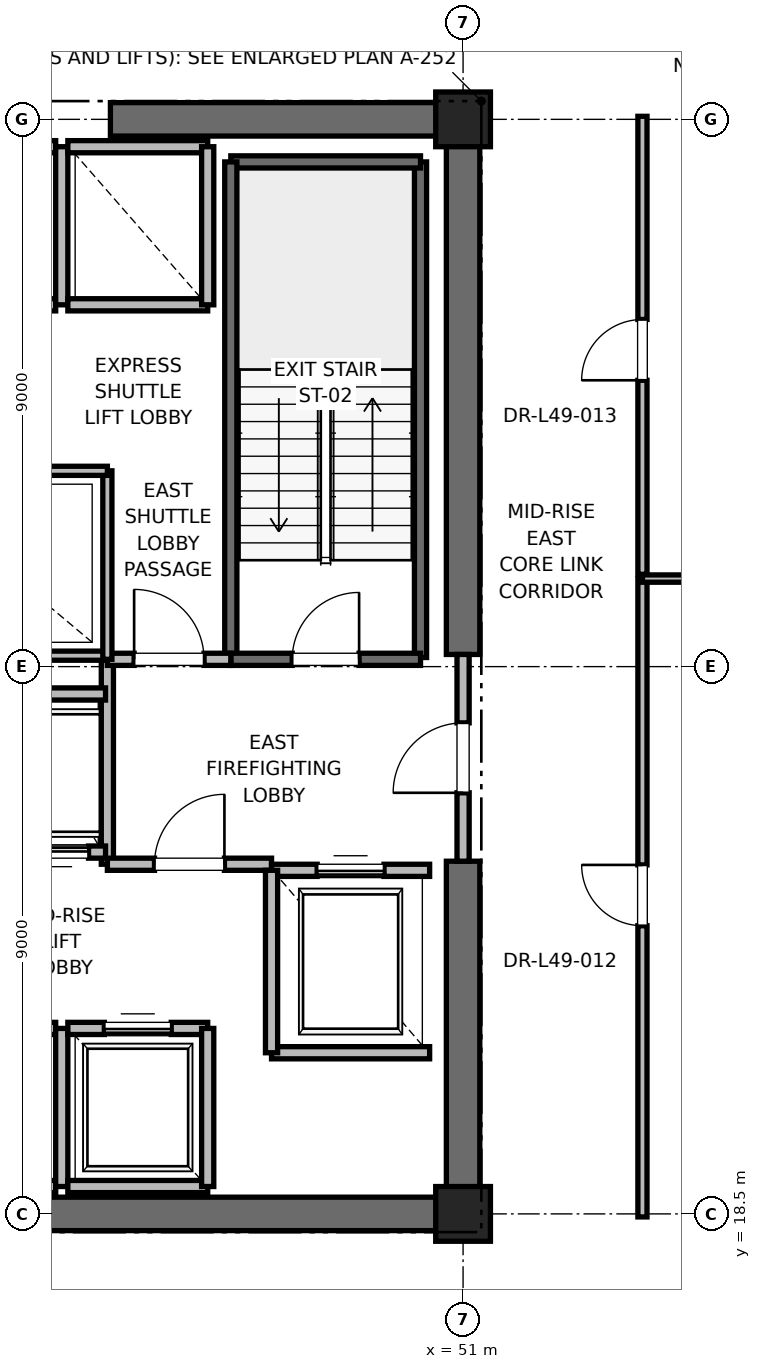
"""IFC4 building model, lengths in metres.
Left out: names, types, materials, properties, quantities, classifications, styles, units other than length and angle.
Written with IfcOpenShell. Run it as: python <this file> out.ifc"""

import sys

from ifc_helpers import new_model, si_unit, direction, frame, frame_2d, origin, origin_2d, place, context, subcontext, project, spatial, rectangle, extrude, element, fill, save


model = new_model("IFC4")
c1 = context("Model", 3, precision=1e-05, world=origin(), true_north=direction((0.0, 1.0)))
c2 = subcontext(c1, "Body", "Model", "MODEL_VIEW")
j1 = project(units=[si_unit("LENGTHUNIT", "METRE"), si_unit("PLANEANGLEUNIT", "RADIAN")], contexts=[c1])
p1 = place(None, origin())
s1 = spatial("IfcSite", under=j1, at=p1, CompositionType="ELEMENT")
p2 = place(p1, origin())
s2 = spatial("IfcBuilding", under=s1, at=p2, CompositionType="ELEMENT")
p3 = place(p2, frame((0.0, 0.0, 213.2)))
s3 = spatial("IfcBuildingStorey", under=s2, at=p3, CompositionType="ELEMENT", Elevation=213.2)
for number, where, z_axis, x_axis in (
    (1, (51.0, 18.5, 0.0), (0.0, 0.0, 1.0), (1.0, 0.0, 0.0)),
    (2, (51.0, 36.5, 0.0), (0.0, 0.0, 1.0), (1.0, 0.0, 0.0)),
):
    element("IfcColumn", number, at=place(p3, frame(where, z_axis=z_axis, x_axis=x_axis)), inside=s3, PredefinedType="PILASTER", context=c2, shape_type="SweptSolid", body=[
        extrude(rectangle(XDim=0.9, YDim=0.9, at=origin_2d()), origin(), (0.0, 0.0, 1.0), 4.0),
    ])
p4 = place(p3, frame((41.8, 18.5, 0.0), z_axis=(0.0, 0.0, 1.0), x_axis=(1.0, 0.0, 0.0)))
e3 = element("IfcWall", 3, at=p4, inside=s3, PredefinedType="SHEAR", context=c2, shape_type="SweptSolid", body=[
    extrude(rectangle(XDim=9.2, YDim=0.55, at=frame_2d((4.6, 0.0))), origin(), (0.0, 0.0, 1.0), 3.775),
])
for number, where, z_axis, x_axis in (
    (4, (45.2, 36.5, 0.0), (0.0, 0.0, 1.0), (1.0, 0.0, 0.0)),
    (5, (51.0, 18.5, 0.0), (0.0, 0.0, 1.0), (0.0, 1.0, 0.0)),
):
    element("IfcWall", number, at=place(p3, frame(where, z_axis=z_axis, x_axis=x_axis)), inside=s3, PredefinedType="SHEAR", context=c2, shape_type="SweptSolid", body=[
        extrude(rectangle(XDim=5.8, YDim=0.55, at=frame_2d((2.9, 0.0))), origin(), (0.0, 0.0, 1.0), 3.775),
    ])
p5 = place(p3, frame((51.0, 27.7, 0.0), z_axis=(0.0, 0.0, 1.0), x_axis=(0.0, 1.0, 0.0)))
e6 = element("IfcWall", 6, at=p5, inside=s3, PredefinedType="SHEAR", context=c2, shape_type="SweptSolid", body=[
    extrude(rectangle(XDim=8.8, YDim=0.55, at=frame_2d((4.4, 0.0))), origin(), (0.0, 0.0, 1.0), 3.775),
])
p6 = place(p3, frame((50.3, 27.65, 0.0), z_axis=(0.0, 0.0, 1.0), x_axis=(0.0, 1.0, 0.0)))
e7 = element("IfcWall", 7, at=p6, inside=s3, PredefinedType="SOLIDWALL", context=c2, shape_type="SweptSolid", body=[
    extrude(rectangle(XDim=8.15, YDim=0.2, at=frame_2d((4.075, 0.0))), origin(), (0.0, 0.0, 1.0), 3.775),
])
p7 = place(p3, frame((47.18, 35.8, 0.0), z_axis=(0.0, 0.0, 1.0), x_axis=(1.0, 0.0, 0.0)))
e8 = element("IfcWall", 8, at=p7, inside=s3, PredefinedType="SOLIDWALL", context=c2, shape_type="SweptSolid", body=[
    extrude(rectangle(XDim=3.12, YDim=0.2, at=frame_2d((1.56, 0.0))), origin(), (0.0, 0.0, 1.0), 3.775),
])
p8 = place(p3, frame((47.18, 27.62, 0.0), z_axis=(0.0, 0.0, 1.0), x_axis=(0.0, 1.0, 0.0)))
e9 = element("IfcWall", 9, at=p8, inside=s3, PredefinedType="SOLIDWALL", context=c2, shape_type="SweptSolid", body=[
    extrude(rectangle(XDim=8.18, YDim=0.2, at=frame_2d((4.09, 0.0))), origin(), (0.0, 0.0, 1.0), 3.775),
])
p9 = place(p3, frame((47.18, 27.62, 0.0), z_axis=(0.0, 0.0, 1.0), x_axis=(1.0, 0.0, 0.0)))
e10 = element("IfcWall", 10, at=p9, inside=s3, PredefinedType="SOLIDWALL", context=c2, shape_type="SweptSolid", body=[
    extrude(rectangle(XDim=3.12, YDim=0.2, at=frame_2d((1.56, 0.0))), origin(), (0.0, 0.0, 1.0), 3.775),
])
p10 = place(p9, frame((1.01, 0.0, 0.0)))
e11 = element("IfcOpeningElement", 11, at=p10, cuts=e10, PredefinedType="OPENING", context=c2, shape_type="SweptSolid", body=[
    extrude(rectangle(XDim=1.1, YDim=2.15, at=frame_2d((0.55, 1.075))), frame((0.0, 0.1, 0.0), z_axis=(0.0, -1.0, 0.0), x_axis=(1.0, 0.0, 0.0)), (0.0, 0.0, 1.0), 0.2),
])
p11 = place(p3, frame((45.15, 24.25, 0.0), z_axis=(0.0, 0.0, 1.0), x_axis=(0.0, 1.0, 0.0)))
e12 = element("IfcWall", 12, at=p11, inside=s3, PredefinedType="PARTITIONING", context=c2, shape_type="SweptSolid", body=[
    extrude(rectangle(XDim=3.37, YDim=0.2, at=frame_2d((1.685, 0.0))), origin(), (0.0, 0.0, 1.0), 3.775),
])
p12 = place(p3, frame((45.15, 24.25, 0.0), z_axis=(0.0, 0.0, 1.0), x_axis=(1.0, 0.0, 0.0)))
e13 = element("IfcWall", 13, at=p12, inside=s3, PredefinedType="PARTITIONING", context=c2, shape_type="SweptSolid", body=[
    extrude(rectangle(XDim=2.7, YDim=0.2, at=frame_2d((1.35, 0.0))), origin(), (0.0, 0.0, 1.0), 3.775),
])
p13 = place(p12, frame((0.775, 0.0, 0.0)))
e14 = element("IfcOpeningElement", 14, at=p13, cuts=e13, PredefinedType="OPENING", context=c2, shape_type="SweptSolid", body=[
    extrude(rectangle(XDim=1.15, YDim=2.2, at=frame_2d((0.575, 1.1))), frame((0.0, 0.1, 0.0), z_axis=(0.0, -1.0, 0.0), x_axis=(1.0, 0.0, 0.0)), (0.0, 0.0, 1.0), 0.2),
])
p14 = place(p3, frame((45.15, 27.62, 0.0), z_axis=(0.0, 0.0, 1.0), x_axis=(1.0, 0.0, 0.0)))
e15 = element("IfcWall", 15, at=p14, inside=s3, PredefinedType="PARTITIONING", context=c2, shape_type="SweptSolid", body=[
    extrude(rectangle(XDim=2.03, YDim=0.2, at=frame_2d((1.015, 0.0))), origin(), (0.0, 0.0, 1.0), 3.775),
])
p15 = place(p14, frame((0.44, 0.0, 0.0)))
e16 = element("IfcOpeningElement", 16, at=p15, cuts=e15, PredefinedType="OPENING", context=c2, shape_type="SweptSolid", body=[
    extrude(rectangle(XDim=1.15, YDim=2.2, at=frame_2d((0.575, 1.1))), frame((0.0, 0.1, 0.0), z_axis=(0.0, -1.0, 0.0), x_axis=(1.0, 0.0, 0.0)), (0.0, 0.0, 1.0), 0.2),
])
p16 = place(p3, frame((51.0, 24.3, 0.0), z_axis=(0.0, 0.0, 1.0), x_axis=(0.0, 1.0, 0.0)))
e17 = element("IfcWall", 17, at=p16, inside=s3, PredefinedType="PARTITIONING", context=c2, shape_type="SweptSolid", body=[
    extrude(rectangle(XDim=3.4, YDim=0.2, at=frame_2d((1.7, 0.0))), origin(), (0.0, 0.0, 1.0), 2.755),
])
p17 = place(p16, frame((1.125, 0.0, 0.0)))
e18 = element("IfcOpeningElement", 18, at=p17, cuts=e17, PredefinedType="OPENING", context=c2, shape_type="SweptSolid", body=[
    extrude(rectangle(XDim=1.15, YDim=2.2, at=frame_2d((0.575, 1.1))), frame((0.0, 0.1, 0.0), z_axis=(0.0, -1.0, 0.0), x_axis=(1.0, 0.0, 0.0)), (0.0, 0.0, 1.0), 0.2),
])
p18 = place(p3, frame((47.85, 21.15, 0.0), z_axis=(0.0, 0.0, 1.0), x_axis=(1.0, 0.0, 0.0)))
e19 = element("IfcWall", 19, at=p18, inside=s3, PredefinedType="SOLIDWALL", context=c2, shape_type="SweptSolid", body=[
    extrude(rectangle(XDim=2.6, YDim=0.2, at=frame_2d((1.3, 0.0))), origin(), (0.0, 0.0, 1.0), 3.775),
])
p19 = place(p3, frame((50.45, 24.15, 0.0), z_axis=(0.0, 0.0, 1.0), x_axis=(-1.0, 0.0, 0.0)))
e20 = element("IfcWall", 20, at=p19, inside=s3, PredefinedType="SOLIDWALL", context=c2, shape_type="SweptSolid", body=[
    extrude(rectangle(XDim=2.6, YDim=0.2, at=frame_2d((1.3, 0.0))), origin(), (0.0, 0.0, 1.0), 2.755),
])
p20 = place(p19, frame((0.75, 0.0, 0.0)))
e21 = element("IfcOpeningElement", 21, at=p20, cuts=e20, PredefinedType="OPENING", context=c2, shape_type="SweptSolid", body=[
    extrude(rectangle(XDim=1.1, YDim=2.2, at=frame_2d((0.55, 1.1))), frame((0.0, 0.1, 0.0), z_axis=(0.0, -1.0, 0.0), x_axis=(1.0, 0.0, 0.0)), (0.0, 0.0, 1.0), 0.2),
])
p21 = place(p3, frame((47.85, 24.15, 0.0), z_axis=(0.0, 0.0, 1.0), x_axis=(0.0, -1.0, 0.0)))
e22 = element("IfcWall", 22, at=p21, inside=s3, PredefinedType="SOLIDWALL", context=c2, shape_type="SweptSolid", body=[
    extrude(rectangle(XDim=3.0, YDim=0.2, at=frame_2d((1.5, 0.0))), origin(), (0.0, 0.0, 1.0), 3.775),
])
p22 = place(p3, frame((42.0, 18.95, 0.0), z_axis=(0.0, 0.0, 1.0), x_axis=(1.0, 0.0, 0.0)))
e23 = element("IfcWall", 23, at=p22, inside=s3, PredefinedType="SOLIDWALL", context=c2, shape_type="SweptSolid", body=[
    extrude(rectangle(XDim=2.3, YDim=0.2, at=frame_2d((1.15, 0.0))), origin(), (0.0, 0.0, 1.0), 2.755),
])
p23 = place(p3, frame((44.3, 21.55, 0.0), z_axis=(0.0, 0.0, 1.0), x_axis=(-1.0, 0.0, 0.0)))
e24 = element("IfcWall", 24, at=p23, inside=s3, PredefinedType="SOLIDWALL", context=c2, shape_type="SweptSolid", body=[
    extrude(rectangle(XDim=2.3, YDim=0.2, at=frame_2d((1.15, 0.0))), origin(), (0.0, 0.0, 1.0), 3.775),
])
p24 = place(p23, frame((0.6, 0.0, 0.0)))
e25 = element("IfcOpeningElement", 25, at=p24, cuts=e24, PredefinedType="OPENING", context=c2, shape_type="SweptSolid", body=[
    extrude(rectangle(XDim=1.1, YDim=2.2, at=frame_2d((0.55, 1.1))), frame((0.0, 0.1, 0.0), z_axis=(0.0, -1.0, 0.0), x_axis=(1.0, 0.0, 0.0)), (0.0, 0.0, 1.0), 0.2),
])
p25 = place(p3, frame((44.4, 18.95, 0.0), z_axis=(0.0, 0.0, 1.0), x_axis=(0.0, 1.0, 0.0)))
e26 = element("IfcWall", 26, at=p25, inside=s3, PredefinedType="SOLIDWALL", context=c2, shape_type="SweptSolid", body=[
    extrude(rectangle(XDim=2.6, YDim=0.2, at=frame_2d((1.3, 0.0))), origin(), (0.0, 0.0, 1.0), 3.775),
])
p26 = place(p3, frame((44.5, 18.95, 0.0), z_axis=(0.0, 0.0, 1.0), x_axis=(1.0, 0.0, 0.0)))
e27 = element("IfcWall", 27, at=p26, inside=s3, PredefinedType="SOLIDWALL", context=c2, shape_type="SweptSolid", body=[
    extrude(rectangle(XDim=2.3, YDim=0.2, at=frame_2d((1.15, 0.0))), origin(), (0.0, 0.0, 1.0), 3.775),
])
p27 = place(p3, frame((46.8, 21.55, 0.0), z_axis=(0.0, 0.0, 1.0), x_axis=(-1.0, 0.0, 0.0)))
e28 = element("IfcWall", 28, at=p27, inside=s3, PredefinedType="SOLIDWALL", context=c2, shape_type="SweptSolid", body=[
    extrude(rectangle(XDim=2.3, YDim=0.2, at=frame_2d((1.15, 0.0))), origin(), (0.0, 0.0, 1.0), 3.775),
])
p28 = place(p27, frame((0.6, 0.0, 0.0)))
e29 = element("IfcOpeningElement", 29, at=p28, cuts=e28, PredefinedType="OPENING", context=c2, shape_type="SweptSolid", body=[
    extrude(rectangle(XDim=1.1, YDim=2.2, at=frame_2d((0.55, 1.1))), frame((0.0, 0.1, 0.0), z_axis=(0.0, -1.0, 0.0), x_axis=(1.0, 0.0, 0.0)), (0.0, 0.0, 1.0), 0.2),
])
p29 = place(p3, frame((46.8, 18.95, 0.0), z_axis=(0.0, 0.0, 1.0), x_axis=(0.0, 1.0, 0.0)))
e30 = element("IfcWall", 30, at=p29, inside=s3, PredefinedType="SOLIDWALL", context=c2, shape_type="SweptSolid", body=[
    extrude(rectangle(XDim=2.6, YDim=0.2, at=frame_2d((1.3, 0.0))), origin(), (0.0, 0.0, 1.0), 3.775),
])
p30 = place(p3, frame((43.46, 24.45, 0.0), z_axis=(0.0, 0.0, 1.0), x_axis=(1.0, 0.0, 0.0)))
e31 = element("IfcWall", 31, at=p30, inside=s3, PredefinedType="SOLIDWALL", context=c2, shape_type="SweptSolid", body=[
    extrude(rectangle(XDim=1.66, YDim=0.2, at=frame_2d((0.83, 0.0))), origin(), (0.0, 0.0, 1.0), 3.775),
])
p31 = place(p30, frame((0.28, 0.0, 0.0)))
e32 = element("IfcOpeningElement", 32, at=p31, cuts=e31, PredefinedType="OPENING", context=c2, shape_type="SweptSolid", body=[
    extrude(rectangle(XDim=1.1, YDim=2.2, at=frame_2d((0.55, 1.1))), frame((0.0, 0.1, 0.0), z_axis=(0.0, -1.0, 0.0), x_axis=(1.0, 0.0, 0.0)), (0.0, 0.0, 1.0), 0.2),
])
p32 = place(p3, frame((45.12, 27.05, 0.0), z_axis=(0.0, 0.0, 1.0), x_axis=(-1.0, 0.0, 0.0)))
e33 = element("IfcWall", 33, at=p32, inside=s3, PredefinedType="SOLIDWALL", context=c2, shape_type="SweptSolid", body=[
    extrude(rectangle(XDim=1.66, YDim=0.2, at=frame_2d((0.83, 0.0))), origin(), (0.0, 0.0, 1.0), 3.775),
])
p33 = place(p3, frame((42.0, 33.45, 0.0), z_axis=(0.0, 0.0, 1.0), x_axis=(1.0, 0.0, 0.0)))
e34 = element("IfcWall", 34, at=p33, inside=s3, PredefinedType="SOLIDWALL", context=c2, shape_type="SweptSolid", body=[
    extrude(rectangle(XDim=2.3, YDim=0.2, at=frame_2d((1.15, 0.0))), origin(), (0.0, 0.0, 1.0), 3.775),
])
p34 = place(p3, frame((44.3, 36.05, 0.0), z_axis=(0.0, 0.0, 1.0), x_axis=(-1.0, 0.0, 0.0)))
e35 = element("IfcWall", 35, at=p34, inside=s3, PredefinedType="SOLIDWALL", context=c2, shape_type="SweptSolid", body=[
    extrude(rectangle(XDim=2.3, YDim=0.2, at=frame_2d((1.15, 0.0))), origin(), (0.0, 0.0, 1.0), 2.755),
])
p35 = place(p3, frame((44.4, 33.45, 0.0), z_axis=(0.0, 0.0, 1.0), x_axis=(0.0, 1.0, 0.0)))
e36 = element("IfcWall", 36, at=p35, inside=s3, PredefinedType="SOLIDWALL", context=c2, shape_type="SweptSolid", body=[
    extrude(rectangle(XDim=2.6, YDim=0.2, at=frame_2d((1.3, 0.0))), origin(), (0.0, 0.0, 1.0), 2.755),
])
p36 = place(p3, frame((44.5, 33.45, 0.0), z_axis=(0.0, 0.0, 1.0), x_axis=(1.0, 0.0, 0.0)))
e37 = element("IfcWall", 37, at=p36, inside=s3, PredefinedType="SOLIDWALL", context=c2, shape_type="SweptSolid", body=[
    extrude(rectangle(XDim=2.3, YDim=0.2, at=frame_2d((1.15, 0.0))), origin(), (0.0, 0.0, 1.0), 3.775),
])
p37 = place(p3, frame((46.8, 36.05, 0.0), z_axis=(0.0, 0.0, 1.0), x_axis=(-1.0, 0.0, 0.0)))
e38 = element("IfcWall", 38, at=p37, inside=s3, PredefinedType="SOLIDWALL", context=c2, shape_type="SweptSolid", body=[
    extrude(rectangle(XDim=2.3, YDim=0.2, at=frame_2d((1.15, 0.0))), origin(), (0.0, 0.0, 1.0), 2.755),
])
p38 = place(p3, frame((46.8, 33.45, 0.0), z_axis=(0.0, 0.0, 1.0), x_axis=(0.0, 1.0, 0.0)))
e39 = element("IfcWall", 39, at=p38, inside=s3, PredefinedType="SOLIDWALL", context=c2, shape_type="SweptSolid", body=[
    extrude(rectangle(XDim=2.6, YDim=0.2, at=frame_2d((1.3, 0.0))), origin(), (0.0, 0.0, 1.0), 3.775),
])
p39 = place(p3, frame((41.56, 27.68, 0.0), z_axis=(0.0, 0.0, 1.0), x_axis=(1.0, 0.0, 0.0)))
e40 = element("IfcWall", 40, at=p39, inside=s3, PredefinedType="PARTITIONING", context=c2, shape_type="SweptSolid", body=[
    extrude(rectangle(XDim=3.59, YDim=0.15, at=frame_2d((1.795, 0.0))), origin(), (0.0, 0.0, 1.0), 2.85),
])
p40 = place(p3, frame((45.15, 27.62, 0.0), z_axis=(0.0, 0.0, 1.0), x_axis=(0.0, 1.0, 0.0)))
e41 = element("IfcWall", 41, at=p40, inside=s3, PredefinedType="PARTITIONING", context=c2, shape_type="SweptSolid", body=[
    extrude(rectangle(XDim=3.1, YDim=0.15, at=frame_2d((1.55, 0.0))), origin(), (0.0, 0.0, 1.0), 2.85),
])
p41 = place(p3, frame((41.56, 30.72, 0.0), z_axis=(0.0, 0.0, 1.0), x_axis=(1.0, 0.0, 0.0)))
e42 = element("IfcWall", 42, at=p41, inside=s3, PredefinedType="PARTITIONING", context=c2, shape_type="SweptSolid", body=[
    extrude(rectangle(XDim=3.59, YDim=0.15, at=frame_2d((1.795, 0.0))), origin(), (0.0, 0.0, 1.0), 2.85),
])
p42 = place(p41, frame((1.355, 0.0, 0.0)))
e43 = element("IfcOpeningElement", 43, at=p42, cuts=e42, PredefinedType="OPENING", context=c2, shape_type="SweptSolid", body=[
    extrude(rectangle(XDim=0.88, YDim=2.1, at=frame_2d((0.44, 1.05))), frame((0.0, 0.075, 0.0), z_axis=(0.0, -1.0, 0.0), x_axis=(1.0, 0.0, 0.0)), (0.0, 0.0, 1.0), 0.15),
])
p43 = place(p3, frame((53.95, 18.45, 0.0), z_axis=(0.0, 0.0, 1.0), x_axis=(0.0, 1.0, 0.0)))
e44 = element("IfcWall", 44, at=p43, inside=s3, PredefinedType="PARTITIONING", context=c2, shape_type="SweptSolid", body=[
    extrude(rectangle(XDim=10.498, YDim=0.15, at=frame_2d((5.249, 0.0))), origin(), (0.0, 0.0, 1.0), 2.85),
])
p44 = place(p43, frame((4.789, 0.0, 0.0)))
e45 = element("IfcOpeningElement", 45, at=p44, cuts=e44, PredefinedType="OPENING", context=c2, shape_type="SweptSolid", body=[
    extrude(rectangle(XDim=1.0, YDim=2.15, at=frame_2d((0.5, 1.075))), frame((0.0, 0.075, 0.0), z_axis=(0.0, -1.0, 0.0), x_axis=(1.0, 0.0, 0.0)), (0.0, 0.0, 1.0), 0.15),
])
p45 = place(p3, frame((53.95, 28.948, 0.0), z_axis=(0.0, 0.0, 1.0), x_axis=(1.0, 0.0, 0.0)))
e46 = element("IfcWall", 46, at=p45, inside=s3, PredefinedType="PARTITIONING", context=c2, shape_type="SweptSolid", body=[
    extrude(rectangle(XDim=11.182, YDim=0.12, at=frame_2d((5.591, 0.0))), origin(), (0.0, 0.0, 1.0), 2.85),
])
p46 = place(p3, frame((53.95, 29.018, 0.0), z_axis=(0.0, 0.0, 1.0), x_axis=(0.0, 1.0, 0.0)))
e47 = element("IfcWall", 47, at=p46, inside=s3, PredefinedType="PARTITIONING", context=c2, shape_type="SweptSolid", body=[
    extrude(rectangle(XDim=7.532, YDim=0.15, at=frame_2d((3.766, 0.0))), origin(), (0.0, 0.0, 1.0), 2.85),
])
p47 = place(p46, frame((3.191, 0.0, 0.0)))
e48 = element("IfcOpeningElement", 48, at=p47, cuts=e47, PredefinedType="OPENING", context=c2, shape_type="SweptSolid", body=[
    extrude(rectangle(XDim=1.0, YDim=2.15, at=frame_2d((0.5, 1.075))), frame((0.0, 0.075, 0.0), z_axis=(0.0, -1.0, 0.0), x_axis=(1.0, 0.0, 0.0)), (0.0, 0.0, 1.0), 0.15),
])
p48 = place(p10, origin())
e49 = element("IfcDoor", 49, at=p48, inside=s3, OperationType="SINGLE_SWING_RIGHT", PredefinedType="DOOR", context=c2, shape_type="SweptSolid", body=[
    extrude(rectangle(XDim=1.1, YDim=2.15, at=frame_2d((0.55, 1.075))), frame((0.0, 0.025, 0.0), z_axis=(0.0, -1.0, 0.0), x_axis=(1.0, 0.0, 0.0)), (0.0, 0.0, 1.0), 0.05),
])
fill(e11, e49)
p49 = place(p13, origin())
e50 = element("IfcDoor", 50, at=p49, inside=s3, OperationType="SINGLE_SWING_RIGHT", PredefinedType="DOOR", context=c2, shape_type="SweptSolid", body=[
    extrude(rectangle(XDim=1.15, YDim=2.2, at=frame_2d((0.575, 1.1))), frame((0.0, 0.025, 0.0), z_axis=(0.0, -1.0, 0.0), x_axis=(1.0, 0.0, 0.0)), (0.0, 0.0, 1.0), 0.05),
])
fill(e14, e50)
p50 = place(p15, origin())
e51 = element("IfcDoor", 51, at=p50, inside=s3, OperationType="SINGLE_SWING_LEFT", PredefinedType="DOOR", context=c2, shape_type="SweptSolid", body=[
    extrude(rectangle(XDim=1.15, YDim=2.2, at=frame_2d((0.575, 1.1))), frame((0.0, 0.025, 0.0), z_axis=(0.0, -1.0, 0.0), x_axis=(1.0, 0.0, 0.0)), (0.0, 0.0, 1.0), 0.05),
])
fill(e16, e51)
p51 = place(p17, origin())
e52 = element("IfcDoor", 52, at=p51, inside=s3, OperationType="SINGLE_SWING_LEFT", PredefinedType="DOOR", context=c2, shape_type="SweptSolid", body=[
    extrude(rectangle(XDim=1.15, YDim=2.2, at=frame_2d((0.575, 1.1))), frame((0.0, 0.025, 0.0), z_axis=(0.0, -1.0, 0.0), x_axis=(1.0, 0.0, 0.0)), (0.0, 0.0, 1.0), 0.05),
])
fill(e18, e52)
p52 = place(p20, origin())
e53 = element("IfcDoor", 53, at=p52, inside=s3, OperationType="SLIDING_TO_RIGHT", PredefinedType="DOOR", context=c2, shape_type="SweptSolid", body=[
    extrude(rectangle(XDim=1.1, YDim=2.2, at=frame_2d((0.55, 1.1))), frame((0.0, 0.025, 0.0), z_axis=(0.0, -1.0, 0.0), x_axis=(1.0, 0.0, 0.0)), (0.0, 0.0, 1.0), 0.05),
])
fill(e21, e53)
p53 = place(p28, origin())
e54 = element("IfcDoor", 54, at=p53, inside=s3, OperationType="SLIDING_TO_RIGHT", PredefinedType="DOOR", context=c2, shape_type="SweptSolid", body=[
    extrude(rectangle(XDim=1.1, YDim=2.2, at=frame_2d((0.55, 1.1))), frame((0.0, 0.025, 0.0), z_axis=(0.0, -1.0, 0.0), x_axis=(1.0, 0.0, 0.0)), (0.0, 0.0, 1.0), 0.05),
])
fill(e29, e54)
p54 = place(p31, origin())
e55 = element("IfcDoor", 55, at=p54, inside=s3, OperationType="SLIDING_TO_RIGHT", PredefinedType="DOOR", context=c2, shape_type="SweptSolid", body=[
    extrude(rectangle(XDim=1.1, YDim=2.2, at=frame_2d((0.55, 1.1))), frame((0.0, 0.025, 0.0), z_axis=(0.0, -1.0, 0.0), x_axis=(1.0, 0.0, 0.0)), (0.0, 0.0, 1.0), 0.05),
])
fill(e32, e55)
p55 = place(p44, origin())
e56 = element("IfcDoor", 56, at=p55, inside=s3, OperationType="SINGLE_SWING_RIGHT", PredefinedType="DOOR", context=c2, shape_type="SweptSolid", body=[
    extrude(rectangle(XDim=1.0, YDim=2.15, at=frame_2d((0.5, 1.075))), frame((0.0, 0.025, 0.0), z_axis=(0.0, -1.0, 0.0), x_axis=(1.0, 0.0, 0.0)), (0.0, 0.0, 1.0), 0.05),
])
fill(e45, e56)
p56 = place(p47, origin())
e57 = element("IfcDoor", 57, at=p56, inside=s3, OperationType="SINGLE_SWING_LEFT", PredefinedType="DOOR", context=c2, shape_type="SweptSolid", body=[
    extrude(rectangle(XDim=1.0, YDim=2.15, at=frame_2d((0.5, 1.075))), frame((0.0, 0.025, 0.0), z_axis=(0.0, -1.0, 0.0), x_axis=(1.0, 0.0, 0.0)), (0.0, 0.0, 1.0), 0.05),
])
fill(e48, e57)
save(model, sys.argv[1])
